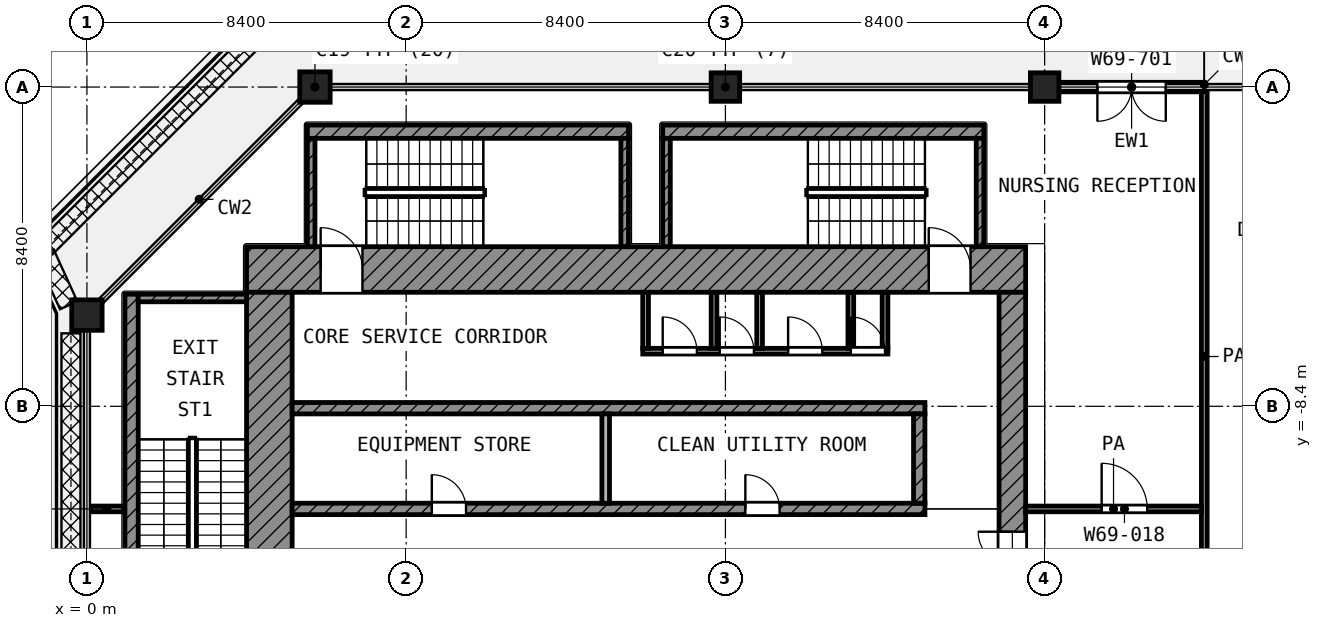
"""IFC4 building model, lengths in metres.
Left out: names, types, materials, properties, quantities, classifications, styles, units other than length and angle.
Written with IfcOpenShell. Run it as: python <this file> out.ifc"""

import sys

from ifc_helpers import new_model, si_unit, direction, frame, frame_2d, origin, origin_2d, place, context, subcontext, project, spatial, rectangle, extrude, element, fill, save


model = new_model("IFC4")
c1 = context("Model", 3, precision=1e-05, world=origin(), true_north=direction((0.0, 1.0)))
c2 = subcontext(c1, "Body", "Model", "MODEL_VIEW")
j1 = project(units=[si_unit("LENGTHUNIT", "METRE"), si_unit("PLANEANGLEUNIT", "RADIAN")], contexts=[c1])
p1 = place(None, origin())
s1 = spatial("IfcSite", under=j1, at=p1, CompositionType="ELEMENT")
p2 = place(p1, origin())
s2 = spatial("IfcBuilding", under=s1, at=p2, CompositionType="ELEMENT")
p3 = place(p2, frame((0.0, 0.0, 319.6)))
s3 = spatial("IfcBuildingStorey", under=s2, at=p3, CompositionType="ELEMENT", Elevation=319.6)
p4 = place(p3, frame((6.0, 0.0, 0.0), z_axis=(0.0, 0.0, 1.0), x_axis=(1.0, 0.0, 0.0)))
e1 = element("IfcColumn", 1, at=p4, inside=s3, PredefinedType="COLUMN", context=c2, shape_type="SweptSolid", body=[
    extrude(rectangle(XDim=0.8, YDim=0.8, at=origin_2d()), origin(), (0.0, 0.0, 1.0), 4.2),
])
for number, where, z_axis, x_axis in (
    (2, (16.8, 0.0, 0.0), (0.0, 0.0, 1.0), (1.0, 0.0, 0.0)),
    (3, (25.2, 0.0, 0.0), (0.0, 0.0, 1.0), (1.0, 0.0, 0.0)),
):
    element("IfcColumn", number, at=place(p3, frame(where, z_axis=z_axis, x_axis=x_axis)), inside=s3, PredefinedType="COLUMN", context=c2, shape_type="SweptSolid", body=[
        extrude(rectangle(XDim=0.75, YDim=0.75, at=origin_2d()), origin(), (0.0, 0.0, 1.0), 4.2),
    ])
p5 = place(p3, frame((0.0, -6.0, 0.0), z_axis=(0.0, 0.0, 1.0), x_axis=(1.0, 0.0, 0.0)))
e4 = element("IfcColumn", 4, at=p5, inside=s3, PredefinedType="COLUMN", context=c2, shape_type="SweptSolid", body=[
    extrude(rectangle(XDim=0.8, YDim=0.8, at=origin_2d()), origin(), (0.0, 0.0, 1.0), 4.2),
])
p6 = place(p3, frame((29.4, 0.0, 0.0), z_axis=(0.0, 0.0, 1.0), x_axis=(-1.0, 0.0, 0.0)))
e5 = element("IfcWall", 5, at=p6, inside=s3, PredefinedType="SOLIDWALL", context=c2, shape_type="SweptSolid", body=[
    extrude(rectangle(XDim=3.825, YDim=0.25, at=frame_2d((1.913, 0.0))), origin(), (0.0, 0.0, 1.0), 3.48),
])
p7 = place(p6, frame((1.012, 0.0, 0.0)))
e6 = element("IfcOpeningElement", 6, at=p7, cuts=e5, PredefinedType="OPENING", context=c2, shape_type="SweptSolid", body=[
    extrude(rectangle(XDim=1.8, YDim=2.1, at=frame_2d((0.9, 1.05))), frame((0.0, 0.135, 0.0), z_axis=(0.0, -1.0, 0.0), x_axis=(1.0, 0.0, 0.0)), (0.0, 0.0, 1.0), 0.27),
])
p8 = place(p3, frame((4.2, -4.8, 0.0), z_axis=(0.0, 0.0, 1.0), x_axis=(1.0, 0.0, 0.0)))
e7 = element("IfcWall", 7, at=p8, inside=s3, PredefinedType="SHEAR", context=c2, shape_type="SweptSolid", body=[
    extrude(rectangle(XDim=20.5, YDim=1.2, at=frame_2d((10.25, 0.0))), origin(), (0.0, 0.0, 1.0), 3.6),
])
p9 = place(p8, frame((1.95, 0.0, 0.0)))
e8 = element("IfcOpeningElement", 8, at=p9, cuts=e7, PredefinedType="OPENING", context=c2, shape_type="SweptSolid", body=[
    extrude(rectangle(XDim=1.1, YDim=2.1, at=frame_2d((0.55, 1.05))), frame((0.0, 0.61, 0.0), z_axis=(0.0, -1.0, 0.0), x_axis=(1.0, 0.0, 0.0)), (0.0, 0.0, 1.0), 1.22),
])
p10 = place(p8, frame((17.95, 0.0, 0.0)))
e9 = element("IfcOpeningElement", 9, at=p10, cuts=e7, PredefinedType="OPENING", context=c2, shape_type="SweptSolid", body=[
    extrude(rectangle(XDim=1.1, YDim=2.1, at=frame_2d((0.55, 1.05))), frame((0.0, 0.61, 0.0), z_axis=(0.0, -1.0, 0.0), x_axis=(1.0, 0.0, 0.0)), (0.0, 0.0, 1.0), 1.22),
])
p11 = place(p3, frame((4.8, -24.7, 0.0), z_axis=(0.0, 0.0, 1.0), x_axis=(0.0, 1.0, 0.0)))
e10 = element("IfcWall", 10, at=p11, inside=s3, PredefinedType="SHEAR", context=c2, shape_type="SweptSolid", body=[
    extrude(rectangle(XDim=19.3, YDim=1.2, at=frame_2d((9.65, 0.0))), origin(), (0.0, 0.0, 1.0), 3.6),
])
p12 = place(p11, frame((11.15, 0.0, 0.0)))
e11 = element("IfcOpeningElement", 11, at=p12, cuts=e10, PredefinedType="OPENING", context=c2, shape_type="SweptSolid", body=[
    extrude(rectangle(XDim=1.1, YDim=2.1, at=frame_2d((0.55, 1.05))), frame((0.0, 0.61, 0.0), z_axis=(0.0, -1.0, 0.0), x_axis=(1.0, 0.0, 0.0)), (0.0, 0.0, 1.0), 1.22),
])
p13 = place(p11, frame((1.85, 0.0, 0.0)))
e12 = element("IfcOpeningElement", 12, at=p13, cuts=e10, PredefinedType="OPENING", context=c2, shape_type="SweptSolid", body=[
    extrude(rectangle(XDim=1.1, YDim=2.1, at=frame_2d((0.55, 1.05))), frame((0.0, 0.61, 0.0), z_axis=(0.0, -1.0, 0.0), x_axis=(1.0, 0.0, 0.0)), (0.0, 0.0, 1.0), 1.22),
])
p14 = place(p3, frame((24.35, -24.0, 0.0), z_axis=(0.0, 0.0, 1.0), x_axis=(0.0, 1.0, 0.0)))
e13 = element("IfcWall", 13, at=p14, inside=s3, PredefinedType="SHEAR", context=c2, shape_type="SweptSolid", body=[
    extrude(rectangle(XDim=18.6, YDim=0.7, at=frame_2d((9.3, 0.0))), origin(), (0.0, 0.0, 1.0), 3.6),
])
p15 = place(p14, frame((10.5, 0.0, 0.0)))
e14 = element("IfcOpeningElement", 14, at=p15, cuts=e13, PredefinedType="OPENING", context=c2, shape_type="SweptSolid", body=[
    extrude(rectangle(XDim=1.8, YDim=2.1, at=frame_2d((0.9, 1.05))), frame((0.0, 0.36, 0.0), z_axis=(0.0, -1.0, 0.0), x_axis=(1.0, 0.0, 0.0)), (0.0, 0.0, 1.0), 0.72),
])
p16 = place(p3, frame((5.4, -8.45, 0.0), z_axis=(0.0, 0.0, 1.0), x_axis=(1.0, 0.0, 0.0)))
e15 = element("IfcWall", 15, at=p16, inside=s3, PredefinedType="SHEAR", context=c2, shape_type="SweptSolid", body=[
    extrude(rectangle(XDim=16.65, YDim=0.3, at=frame_2d((8.325, 0.0))), origin(), (0.0, 0.0, 1.0), 3.6),
])
p17 = place(p3, frame((5.4, -11.1, 0.0), z_axis=(0.0, 0.0, 1.0), x_axis=(1.0, 0.0, 0.0)))
e16 = element("IfcWall", 16, at=p17, inside=s3, PredefinedType="SHEAR", context=c2, shape_type="SweptSolid", body=[
    extrude(rectangle(XDim=16.65, YDim=0.3, at=frame_2d((8.325, 0.0))), origin(), (0.0, 0.0, 1.0), 3.6),
])
p18 = place(p17, frame((3.675, 0.0, 0.0)))
e17 = element("IfcOpeningElement", 17, at=p18, cuts=e16, PredefinedType="OPENING", context=c2, shape_type="SweptSolid", body=[
    extrude(rectangle(XDim=0.9, YDim=2.1, at=frame_2d((0.45, 1.05))), frame((0.0, 0.16, 0.0), z_axis=(0.0, -1.0, 0.0), x_axis=(1.0, 0.0, 0.0)), (0.0, 0.0, 1.0), 0.32),
])
p19 = place(p17, frame((11.925, 0.0, 0.0)))
e18 = element("IfcOpeningElement", 18, at=p19, cuts=e16, PredefinedType="OPENING", context=c2, shape_type="SweptSolid", body=[
    extrude(rectangle(XDim=0.9, YDim=2.1, at=frame_2d((0.45, 1.05))), frame((0.0, 0.16, 0.0), z_axis=(0.0, -1.0, 0.0), x_axis=(1.0, 0.0, 0.0)), (0.0, 0.0, 1.0), 0.32),
])
p20 = place(p3, frame((21.9, -10.95, 0.0), z_axis=(0.0, 0.0, 1.0), x_axis=(0.0, 1.0, 0.0)))
e19 = element("IfcWall", 19, at=p20, inside=s3, PredefinedType="SHEAR", context=c2, shape_type="SweptSolid", body=[
    extrude(rectangle(XDim=2.35, YDim=0.3, at=frame_2d((1.175, 0.0))), origin(), (0.0, 0.0, 1.0), 3.6),
])
p21 = place(p3, frame((13.65, -10.95, 0.0), z_axis=(0.0, 0.0, 1.0), x_axis=(0.0, 1.0, 0.0)))
e20 = element("IfcWall", 20, at=p21, inside=s3, PredefinedType="PARTITIONING", context=c2, shape_type="SweptSolid", body=[
    extrude(rectangle(XDim=2.35, YDim=0.2, at=frame_2d((1.175, 0.0))), origin(), (0.0, 0.0, 1.0), 3.6),
])
p22 = place(p3, frame((14.625, -6.95, 0.0), z_axis=(0.0, 0.0, 1.0), x_axis=(1.0, 0.0, 0.0)))
e21 = element("IfcWall", 21, at=p22, inside=s3, PredefinedType="PARTITIONING", context=c2, shape_type="SweptSolid", body=[
    extrude(rectangle(XDim=6.45, YDim=0.15, at=frame_2d((3.225, 0.0))), origin(), (0.0, 0.0, 1.0), 3.6),
])
p23 = place(p22, frame((0.525, 0.0, 0.0)))
e22 = element("IfcOpeningElement", 22, at=p23, cuts=e21, PredefinedType="OPENING", context=c2, shape_type="SweptSolid", body=[
    extrude(rectangle(XDim=0.9, YDim=2.1, at=frame_2d((0.45, 1.05))), frame((0.0, 0.085, 0.0), z_axis=(0.0, -1.0, 0.0), x_axis=(1.0, 0.0, 0.0)), (0.0, 0.0, 1.0), 0.17),
])
p24 = place(p22, frame((2.025, 0.0, 0.0)))
e23 = element("IfcOpeningElement", 23, at=p24, cuts=e21, PredefinedType="OPENING", context=c2, shape_type="SweptSolid", body=[
    extrude(rectangle(XDim=0.9, YDim=2.1, at=frame_2d((0.45, 1.05))), frame((0.0, 0.085, 0.0), z_axis=(0.0, -1.0, 0.0), x_axis=(1.0, 0.0, 0.0)), (0.0, 0.0, 1.0), 0.17),
])
p25 = place(p22, frame((3.825, 0.0, 0.0)))
e24 = element("IfcOpeningElement", 24, at=p25, cuts=e21, PredefinedType="OPENING", context=c2, shape_type="SweptSolid", body=[
    extrude(rectangle(XDim=0.9, YDim=2.1, at=frame_2d((0.45, 1.05))), frame((0.0, 0.085, 0.0), z_axis=(0.0, -1.0, 0.0), x_axis=(1.0, 0.0, 0.0)), (0.0, 0.0, 1.0), 0.17),
])
p26 = place(p22, frame((5.475, 0.0, 0.0)))
e25 = element("IfcOpeningElement", 25, at=p26, cuts=e21, PredefinedType="OPENING", context=c2, shape_type="SweptSolid", body=[
    extrude(rectangle(XDim=0.9, YDim=2.1, at=frame_2d((0.45, 1.05))), frame((0.0, 0.085, 0.0), z_axis=(0.0, -1.0, 0.0), x_axis=(1.0, 0.0, 0.0)), (0.0, 0.0, 1.0), 0.17),
])
for number, where, z_axis, x_axis in (
    (26, (14.7, -6.875, 0.0), (0.0, 0.0, 1.0), (0.0, 1.0, 0.0)),
    (27, (16.5, -6.875, 0.0), (0.0, 0.0, 1.0), (0.0, 1.0, 0.0)),
    (28, (17.7, -6.875, 0.0), (0.0, 0.0, 1.0), (0.0, 1.0, 0.0)),
    (29, (20.1, -6.875, 0.0), (0.0, 0.0, 1.0), (0.0, 1.0, 0.0)),
    (30, (21.0, -6.875, 0.0), (0.0, 0.0, 1.0), (0.0, 1.0, 0.0)),
):
    element("IfcWall", number, at=place(p3, frame(where, z_axis=z_axis, x_axis=x_axis)), inside=s3, PredefinedType="PARTITIONING", context=c2, shape_type="SweptSolid", body=[
        extrude(rectangle(XDim=1.475, YDim=0.15, at=frame_2d((0.738, 0.0))), origin(), (0.0, 0.0, 1.0), 3.6),
    ])
p27 = place(p3, frame((1.175, -13.9, 0.0), z_axis=(0.0, 0.0, 1.0), x_axis=(0.0, 1.0, 0.0)))
e31 = element("IfcWall", 31, at=p27, inside=s3, PredefinedType="SHEAR", context=c2, shape_type="SweptSolid", body=[
    extrude(rectangle(XDim=8.45, YDim=0.35, at=frame_2d((4.225, 0.0))), origin(), (0.0, 0.0, 1.0), 3.6),
])
p28 = place(p3, frame((1.35, -5.55, 0.0), z_axis=(0.0, 0.0, 1.0), x_axis=(1.0, 0.0, 0.0)))
e32 = element("IfcWall", 32, at=p28, inside=s3, PredefinedType="SHEAR", context=c2, shape_type="SweptSolid", body=[
    extrude(rectangle(XDim=2.85, YDim=0.2, at=frame_2d((1.425, 0.0))), origin(), (0.0, 0.0, 1.0), 3.6),
])
p29 = place(p3, frame((5.8, -1.175, 0.0), z_axis=(0.0, 0.0, 1.0), x_axis=(1.0, 0.0, 0.0)))
e33 = element("IfcWall", 33, at=p29, inside=s3, PredefinedType="SHEAR", context=c2, shape_type="SweptSolid", body=[
    extrude(rectangle(XDim=8.45, YDim=0.35, at=frame_2d((4.225, 0.0))), origin(), (0.0, 0.0, 1.0), 3.6),
])
for number, where, z_axis, x_axis in (
    (34, (5.9, -4.2, 0.0), (0.0, 0.0, 1.0), (0.0, 1.0, 0.0)),
    (35, (14.15, -4.2, 0.0), (0.0, 0.0, 1.0), (0.0, 1.0, 0.0)),
):
    element("IfcWall", number, at=place(p3, frame(where, z_axis=z_axis, x_axis=x_axis)), inside=s3, PredefinedType="SHEAR", context=c2, shape_type="SweptSolid", body=[
        extrude(rectangle(XDim=2.85, YDim=0.2, at=frame_2d((1.425, 0.0))), origin(), (0.0, 0.0, 1.0), 3.6),
    ])
p30 = place(p3, frame((15.15, -1.175, 0.0), z_axis=(0.0, 0.0, 1.0), x_axis=(1.0, 0.0, 0.0)))
e36 = element("IfcWall", 36, at=p30, inside=s3, PredefinedType="SHEAR", context=c2, shape_type="SweptSolid", body=[
    extrude(rectangle(XDim=8.45, YDim=0.35, at=frame_2d((4.225, 0.0))), origin(), (0.0, 0.0, 1.0), 3.6),
])
for number, where, z_axis, x_axis in (
    (37, (15.25, -4.2, 0.0), (0.0, 0.0, 1.0), (0.0, 1.0, 0.0)),
    (38, (23.5, -4.2, 0.0), (0.0, 0.0, 1.0), (0.0, 1.0, 0.0)),
):
    element("IfcWall", number, at=place(p3, frame(where, z_axis=z_axis, x_axis=x_axis)), inside=s3, PredefinedType="SHEAR", context=c2, shape_type="SweptSolid", body=[
        extrude(rectangle(XDim=2.85, YDim=0.2, at=frame_2d((1.425, 0.0))), origin(), (0.0, 0.0, 1.0), 3.6),
    ])
p31 = place(p3, frame((0.08, -11.1, 0.0), z_axis=(0.0, 0.0, 1.0), x_axis=(1.0, 0.0, 0.0)))
e39 = element("IfcWall", 39, at=p31, inside=s3, PredefinedType="PARTITIONING", context=c2, shape_type="SweptSolid", body=[
    extrude(rectangle(XDim=0.89, YDim=0.15, at=frame_2d((0.445, 0.0))), origin(), (0.0, 0.0, 1.0), 2.7),
])
p32 = place(p3, frame((24.7, -11.1, 0.0), z_axis=(0.0, 0.0, 1.0), x_axis=(1.0, 0.0, 0.0)))
e40 = element("IfcWall", 40, at=p32, inside=s3, PredefinedType="PARTITIONING", context=c2, shape_type="SweptSolid", body=[
    extrude(rectangle(XDim=4.625, YDim=0.15, at=frame_2d((2.312, 0.0))), origin(), (0.0, 0.0, 1.0), 3.6),
])
p33 = place(p32, frame((2.0, 0.0, 0.0)))
e41 = element("IfcOpeningElement", 41, at=p33, cuts=e40, PredefinedType="OPENING", context=c2, shape_type="SweptSolid", body=[
    extrude(rectangle(XDim=1.2, YDim=2.1, at=frame_2d((0.6, 1.05))), frame((0.0, 0.085, 0.0), z_axis=(0.0, -1.0, 0.0), x_axis=(1.0, 0.0, 0.0)), (0.0, 0.0, 1.0), 0.17),
])
p34 = place(p3, frame((29.4, -14.1, 0.0), z_axis=(0.0, 0.0, 1.0), x_axis=(0.0, 1.0, 0.0)))
e42 = element("IfcWall", 42, at=p34, inside=s3, PredefinedType="PARTITIONING", context=c2, shape_type="SweptSolid", body=[
    extrude(rectangle(XDim=14.02, YDim=0.15, at=frame_2d((7.01, 0.0))), origin(), (0.0, 0.0, 1.0), 3.6),
])
p35 = place(p7, origin())
e43 = element("IfcDoor", 43, at=p35, inside=s3, OperationType="DOUBLE_DOOR_SINGLE_SWING", PredefinedType="DOOR", context=c2, shape_type="SweptSolid", body=[
    extrude(rectangle(XDim=1.8, YDim=2.1, at=frame_2d((0.9, 1.05))), frame((0.0, 0.025, 0.0), z_axis=(0.0, -1.0, 0.0), x_axis=(1.0, 0.0, 0.0)), (0.0, 0.0, 1.0), 0.05),
])
fill(e6, e43)
p36 = place(p9, origin())
e44 = element("IfcDoor", 44, at=p36, inside=s3, OperationType="SINGLE_SWING_LEFT", PredefinedType="DOOR", context=c2, shape_type="SweptSolid", body=[
    extrude(rectangle(XDim=1.1, YDim=2.1, at=frame_2d((0.55, 1.05))), frame((0.0, 0.025, 0.0), z_axis=(0.0, -1.0, 0.0), x_axis=(1.0, 0.0, 0.0)), (0.0, 0.0, 1.0), 0.05),
])
fill(e8, e44)
p37 = place(p10, origin())
e45 = element("IfcDoor", 45, at=p37, inside=s3, OperationType="SINGLE_SWING_LEFT", PredefinedType="DOOR", context=c2, shape_type="SweptSolid", body=[
    extrude(rectangle(XDim=1.1, YDim=2.1, at=frame_2d((0.55, 1.05))), frame((0.0, 0.025, 0.0), z_axis=(0.0, -1.0, 0.0), x_axis=(1.0, 0.0, 0.0)), (0.0, 0.0, 1.0), 0.05),
])
fill(e9, e45)
p38 = place(p15, origin())
e46 = element("IfcDoor", 46, at=p38, inside=s3, OperationType="DOUBLE_DOOR_SINGLE_SWING", PredefinedType="DOOR", context=c2, shape_type="SweptSolid", body=[
    extrude(rectangle(XDim=1.8, YDim=2.1, at=frame_2d((0.9, 1.05))), frame((0.0, 0.025, 0.0), z_axis=(0.0, -1.0, 0.0), x_axis=(1.0, 0.0, 0.0)), (0.0, 0.0, 1.0), 0.05),
])
fill(e14, e46)
p39 = place(p23, origin())
e47 = element("IfcDoor", 47, at=p39, inside=s3, OperationType="SINGLE_SWING_LEFT", PredefinedType="DOOR", context=c2, shape_type="SweptSolid", body=[
    extrude(rectangle(XDim=0.9, YDim=2.1, at=frame_2d((0.45, 1.05))), frame((0.0, 0.025, 0.0), z_axis=(0.0, -1.0, 0.0), x_axis=(1.0, 0.0, 0.0)), (0.0, 0.0, 1.0), 0.05),
])
fill(e22, e47)
p40 = place(p24, origin())
e48 = element("IfcDoor", 48, at=p40, inside=s3, OperationType="SINGLE_SWING_LEFT", PredefinedType="DOOR", context=c2, shape_type="SweptSolid", body=[
    extrude(rectangle(XDim=0.9, YDim=2.1, at=frame_2d((0.45, 1.05))), frame((0.0, 0.025, 0.0), z_axis=(0.0, -1.0, 0.0), x_axis=(1.0, 0.0, 0.0)), (0.0, 0.0, 1.0), 0.05),
])
fill(e23, e48)
p41 = place(p25, origin())
e49 = element("IfcDoor", 49, at=p41, inside=s3, OperationType="SINGLE_SWING_LEFT", PredefinedType="DOOR", context=c2, shape_type="SweptSolid", body=[
    extrude(rectangle(XDim=0.9, YDim=2.1, at=frame_2d((0.45, 1.05))), frame((0.0, 0.025, 0.0), z_axis=(0.0, -1.0, 0.0), x_axis=(1.0, 0.0, 0.0)), (0.0, 0.0, 1.0), 0.05),
])
fill(e24, e49)
p42 = place(p26, origin())
e50 = element("IfcDoor", 50, at=p42, inside=s3, OperationType="SINGLE_SWING_LEFT", PredefinedType="DOOR", context=c2, shape_type="SweptSolid", body=[
    extrude(rectangle(XDim=0.9, YDim=2.1, at=frame_2d((0.45, 1.05))), frame((0.0, 0.025, 0.0), z_axis=(0.0, -1.0, 0.0), x_axis=(1.0, 0.0, 0.0)), (0.0, 0.0, 1.0), 0.05),
])
fill(e25, e50)
p43 = place(p18, origin())
e51 = element("IfcDoor", 51, at=p43, inside=s3, OperationType="SINGLE_SWING_LEFT", PredefinedType="DOOR", context=c2, shape_type="SweptSolid", body=[
    extrude(rectangle(XDim=0.9, YDim=2.1, at=frame_2d((0.45, 1.05))), frame((0.0, 0.025, 0.0), z_axis=(0.0, -1.0, 0.0), x_axis=(1.0, 0.0, 0.0)), (0.0, 0.0, 1.0), 0.05),
])
fill(e17, e51)
p44 = place(p19, origin())
e52 = element("IfcDoor", 52, at=p44, inside=s3, OperationType="SINGLE_SWING_LEFT", PredefinedType="DOOR", context=c2, shape_type="SweptSolid", body=[
    extrude(rectangle(XDim=0.9, YDim=2.1, at=frame_2d((0.45, 1.05))), frame((0.0, 0.025, 0.0), z_axis=(0.0, -1.0, 0.0), x_axis=(1.0, 0.0, 0.0)), (0.0, 0.0, 1.0), 0.05),
])
fill(e18, e52)
p45 = place(p33, origin())
e53 = element("IfcDoor", 53, at=p45, inside=s3, OperationType="SINGLE_SWING_LEFT", PredefinedType="DOOR", context=c2, shape_type="SweptSolid", body=[
    extrude(rectangle(XDim=1.2, YDim=2.1, at=frame_2d((0.6, 1.05))), frame((0.0, 0.025, 0.0), z_axis=(0.0, -1.0, 0.0), x_axis=(1.0, 0.0, 0.0)), (0.0, 0.0, 1.0), 0.05),
])
fill(e41, e53)
save(model, sys.argv[1])
